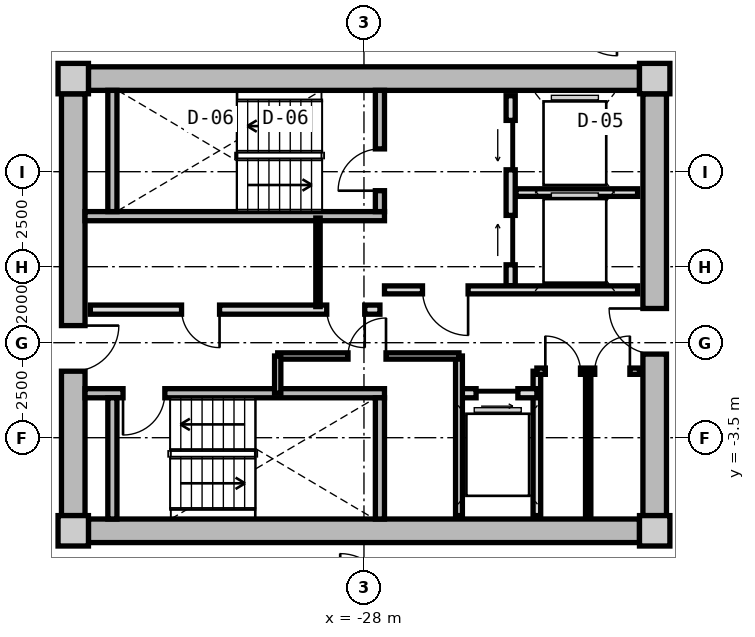
"""IFC4 building model, lengths in metres.
Left out: names, types, materials, properties, quantities, classifications, styles, units other than length and angle.
Written with IfcOpenShell. Run it as: python <this file> out.ifc"""

import sys

from ifc_helpers import new_model, si_unit, direction, frame, frame_2d, origin, origin_2d, place, context, subcontext, project, spatial, rectangle, extrude, source, transform, mapped, element, fill, save


model = new_model("IFC4")
c1 = context("Model", 3, precision=1e-05, world=origin(), true_north=direction((0.0, 1.0)))
c2 = subcontext(c1, "Body", "Model", "MODEL_VIEW")
j1 = project(units=[si_unit("LENGTHUNIT", "METRE"), si_unit("PLANEANGLEUNIT", "RADIAN")], contexts=[c1])
p1 = place(None, origin())
s1 = spatial("IfcSite", under=j1, at=p1, CompositionType="ELEMENT")
p2 = place(p1, origin())
s2 = spatial("IfcBuilding", under=s1, at=p2, CompositionType="ELEMENT")
p3 = place(p2, frame((0.0, 0.0, 164.8)))
s3 = spatial("IfcBuildingStorey", under=s2, at=p3, CompositionType="ELEMENT", Elevation=164.8)
m1 = source(origin(), c2, "Body", "SweptSolid", [
    extrude(rectangle(XDim=0.8, YDim=0.8, at=origin_2d()), origin(), (0.0, 0.0, 1.0), 3.05),
])
for number, where, z_axis, x_axis in (
    (1, (-35.65, -5.95, 0.0), (0.0, 0.0, 1.0), (1.0, 0.0, 0.0)),
    (2, (-20.35, -5.95, 0.0), (0.0, 0.0, 1.0), (1.0, 0.0, 0.0)),
    (3, (-20.35, 5.95, 0.0), (0.0, 0.0, 1.0), (1.0, 0.0, 0.0)),
    (4, (-35.65, 5.95, 0.0), (0.0, 0.0, 1.0), (1.0, 0.0, 0.0)),
):
    element("IfcColumn", number, at=place(p3, frame(where, z_axis=z_axis, x_axis=x_axis)), inside=s3, PredefinedType="COLUMN", context=c2, shape_type="MappedRepresentation", body=[
        mapped(m1, transform((0.0, 0.0, 0.0), x_axis=(1.0, 0.0, 0.0), y_axis=(0.0, 1.0, 0.0), z_axis=(0.0, 0.0, 1.0), scale=1.0)),
    ])
m2 = source(origin(), c2, "Body", "SweptSolid", [
    extrude(rectangle(XDim=14.5, YDim=0.62, at=frame_2d((7.25, 0.0))), origin(), (0.0, 0.0, 1.0), 2.81),
])
for number, where, z_axis, x_axis in (
    (5, (-35.25, 5.95, 0.0), (0.0, 0.0, 1.0), (1.0, 0.0, 0.0)),
    (6, (-20.75, -5.95, 0.0), (0.0, 0.0, 1.0), (-1.0, 0.0, 0.0)),
):
    element("IfcWall", number, at=place(p3, frame(where, z_axis=z_axis, x_axis=x_axis)), inside=s3, PredefinedType="SHEAR", context=c2, shape_type="MappedRepresentation", body=[
        mapped(m2, transform((0.0, 0.0, 0.0), x_axis=(1.0, 0.0, 0.0), y_axis=(0.0, 1.0, 0.0), z_axis=(0.0, 0.0, 1.0), scale=1.0)),
    ])
m3 = source(origin(), c2, "Body", "SweptSolid", [
    extrude(rectangle(XDim=11.1, YDim=0.62, at=frame_2d((5.55, 0.0))), origin(), (0.0, 0.0, 1.0), 2.81),
])
p4 = place(p3, frame((-35.65, -5.55, 0.0), z_axis=(0.0, 0.0, 1.0), x_axis=(0.0, 1.0, 0.0)))
e7 = element("IfcWall", 7, at=p4, inside=s3, PredefinedType="SHEAR", context=c2, shape_type="MappedRepresentation", body=[
    mapped(m3, transform((0.0, 0.0, 0.0), x_axis=(1.0, 0.0, 0.0), y_axis=(0.0, 1.0, 0.0), z_axis=(0.0, 0.0, 1.0), scale=1.0)),
])
p5 = place(p4, frame((3.8, 0.0, 0.0)))
e8 = element("IfcOpeningElement", 8, at=p5, cuts=e7, PredefinedType="OPENING", context=c2, shape_type="SweptSolid", body=[
    extrude(rectangle(XDim=1.2, YDim=2.15, at=frame_2d((0.6, 1.075))), frame((0.0, 0.32, 0.0), z_axis=(0.0, -1.0, 0.0), x_axis=(1.0, 0.0, 0.0)), (0.0, 0.0, 1.0), 0.64),
])
p6 = place(p3, frame((-20.35, 5.55, 0.0), z_axis=(0.0, 0.0, 1.0), x_axis=(0.0, -1.0, 0.0)))
e9 = element("IfcWall", 9, at=p6, inside=s3, PredefinedType="SHEAR", context=c2, shape_type="MappedRepresentation", body=[
    mapped(m3, transform((0.0, 0.0, 0.0), x_axis=(1.0, 0.0, 0.0), y_axis=(0.0, 1.0, 0.0), z_axis=(0.0, 0.0, 1.0), scale=1.0)),
])
p7 = place(p6, frame((5.65, 0.0, 0.0)))
e10 = element("IfcOpeningElement", 10, at=p7, cuts=e9, PredefinedType="OPENING", context=c2, shape_type="SweptSolid", body=[
    extrude(rectangle(XDim=1.2, YDim=2.15, at=frame_2d((0.6, 1.075))), frame((0.0, 0.32, 0.0), z_axis=(0.0, -1.0, 0.0), x_axis=(1.0, 0.0, 0.0)), (0.0, 0.0, 1.0), 0.64),
])
m4 = source(origin(), c2, "Body", "SweptSolid", [
    extrude(rectangle(XDim=7.88, YDim=0.24, at=frame_2d((3.94, 0.0))), origin(), (0.0, 0.0, 1.0), 2.81),
])
p8 = place(p3, frame((-35.34, 2.33, 0.0), z_axis=(0.0, 0.0, 1.0), x_axis=(1.0, 0.0, 0.0)))
e11 = element("IfcWall", 11, at=p8, inside=s3, PredefinedType="PARTITIONING", context=c2, shape_type="MappedRepresentation", body=[
    mapped(m4, transform((0.0, 0.0, 0.0), x_axis=(1.0, 0.0, 0.0), y_axis=(0.0, 1.0, 0.0), z_axis=(0.0, 0.0, 1.0), scale=1.0)),
])
m5 = source(origin(), c2, "Body", "SweptSolid", [
    extrude(rectangle(XDim=3.19, YDim=0.24, at=frame_2d((1.595, 0.0))), origin(), (0.0, 0.0, 1.0), 2.81),
])
p9 = place(p3, frame((-34.62, 2.45, 0.0), z_axis=(0.0, 0.0, 1.0), x_axis=(0.0, 1.0, 0.0)))
e12 = element("IfcWall", 12, at=p9, inside=s3, PredefinedType="PARTITIONING", context=c2, shape_type="MappedRepresentation", body=[
    mapped(m5, transform((0.0, 0.0, 0.0), x_axis=(1.0, 0.0, 0.0), y_axis=(0.0, 1.0, 0.0), z_axis=(0.0, 0.0, 1.0), scale=1.0)),
])
p10 = place(p3, frame((-27.58, 2.45, 0.0), z_axis=(0.0, 0.0, 1.0), x_axis=(0.0, 1.0, 0.0)))
e13 = element("IfcWall", 13, at=p10, inside=s3, PredefinedType="PARTITIONING", context=c2, shape_type="MappedRepresentation", body=[
    mapped(m5, transform((0.0, 0.0, 0.0), x_axis=(1.0, 0.0, 0.0), y_axis=(0.0, 1.0, 0.0), z_axis=(0.0, 0.0, 1.0), scale=1.0)),
])
p11 = place(p10, frame((0.55, 0.0, 0.0)))
e14 = element("IfcOpeningElement", 14, at=p11, cuts=e13, PredefinedType="OPENING", context=c2, shape_type="SweptSolid", body=[
    extrude(rectangle(XDim=1.1, YDim=2.15, at=frame_2d((0.55, 1.075))), frame((0.0, 0.13, 0.0), z_axis=(0.0, -1.0, 0.0), x_axis=(1.0, 0.0, 0.0)), (0.0, 0.0, 1.0), 0.26),
])
p12 = place(p3, frame((-35.34, -2.33, 0.0), z_axis=(0.0, 0.0, 1.0), x_axis=(1.0, 0.0, 0.0)))
e15 = element("IfcWall", 15, at=p12, inside=s3, PredefinedType="PARTITIONING", context=c2, shape_type="MappedRepresentation", body=[
    mapped(m4, transform((0.0, 0.0, 0.0), x_axis=(1.0, 0.0, 0.0), y_axis=(0.0, 1.0, 0.0), z_axis=(0.0, 0.0, 1.0), scale=1.0)),
])
p13 = place(p12, frame((1.0, 0.0, 0.0)))
e16 = element("IfcOpeningElement", 16, at=p13, cuts=e15, PredefinedType="OPENING", context=c2, shape_type="SweptSolid", body=[
    extrude(rectangle(XDim=1.1, YDim=2.15, at=frame_2d((0.55, 1.075))), frame((0.0, 0.13, 0.0), z_axis=(0.0, -1.0, 0.0), x_axis=(1.0, 0.0, 0.0)), (0.0, 0.0, 1.0), 0.26),
])
for number, where, z_axis, x_axis in (
    (17, (-34.62, -5.64, 0.0), (0.0, 0.0, 1.0), (0.0, 1.0, 0.0)),
    (18, (-27.58, -5.64, 0.0), (0.0, 0.0, 1.0), (0.0, 1.0, 0.0)),
):
    element("IfcWall", number, at=place(p3, frame(where, z_axis=z_axis, x_axis=x_axis)), inside=s3, PredefinedType="PARTITIONING", context=c2, shape_type="MappedRepresentation", body=[
        mapped(m5, transform((0.0, 0.0, 0.0), x_axis=(1.0, 0.0, 0.0), y_axis=(0.0, 1.0, 0.0), z_axis=(0.0, 0.0, 1.0), scale=1.0)),
    ])
m6 = source(origin(), c2, "Body", "SweptSolid", [
    extrude(rectangle(XDim=5.0, YDim=0.24, at=frame_2d((2.5, 0.0))), origin(), (0.0, 0.0, 1.0), 2.795),
])
p14 = place(p3, frame((-24.14, 0.5, 0.0), z_axis=(0.0, 0.0, 1.0), x_axis=(0.0, 1.0, 0.0)))
e19 = element("IfcWall", 19, at=p14, inside=s3, PredefinedType="PARTITIONING", context=c2, shape_type="MappedRepresentation", body=[
    mapped(m6, transform((0.0, 0.0, 0.0), x_axis=(1.0, 0.0, 0.0), y_axis=(0.0, 1.0, 0.0), z_axis=(0.0, 0.0, 1.0), scale=1.0)),
])
p15 = place(p14, frame((3.05, 0.0, 0.0)))
e20 = element("IfcOpeningElement", 20, at=p15, cuts=e19, PredefinedType="OPENING", context=c2, shape_type="SweptSolid", body=[
    extrude(rectangle(XDim=1.3, YDim=2.2, at=frame_2d((0.65, 1.1))), frame((0.0, 0.13, 0.0), z_axis=(0.0, -1.0, 0.0), x_axis=(1.0, 0.0, 0.0)), (0.0, 0.0, 1.0), 0.26),
])
p16 = place(p14, frame((0.55, 0.0, 0.0)))
e21 = element("IfcOpeningElement", 21, at=p16, cuts=e19, PredefinedType="OPENING", context=c2, shape_type="SweptSolid", body=[
    extrude(rectangle(XDim=1.3, YDim=2.2, at=frame_2d((0.65, 1.1))), frame((0.0, 0.13, 0.0), z_axis=(0.0, -1.0, 0.0), x_axis=(1.0, 0.0, 0.0)), (0.0, 0.0, 1.0), 0.26),
])
m7 = source(origin(), c2, "Body", "SweptSolid", [
    extrude(rectangle(XDim=3.2, YDim=0.2, at=frame_2d((1.6, 0.0))), origin(), (0.0, 0.0, 1.0), 2.795),
])
p17 = place(p3, frame((-24.0, 2.95, 0.0), z_axis=(0.0, 0.0, 1.0), x_axis=(1.0, 0.0, 0.0)))
e22 = element("IfcWall", 22, at=p17, inside=s3, PredefinedType="PARTITIONING", context=c2, shape_type="MappedRepresentation", body=[
    mapped(m7, transform((0.0, 0.0, 0.0), x_axis=(1.0, 0.0, 0.0), y_axis=(0.0, 1.0, 0.0), z_axis=(0.0, 0.0, 1.0), scale=1.0)),
])
m8 = source(origin(), c2, "Body", "SweptSolid", [
    extrude(rectangle(XDim=6.66, YDim=0.21, at=frame_2d((3.33, 0.0))), origin(), (0.0, 0.0, 1.0), 2.795),
])
p18 = place(p3, frame((-27.46, 0.39, 0.0), z_axis=(0.0, 0.0, 1.0), x_axis=(1.0, 0.0, 0.0)))
e23 = element("IfcWall", 23, at=p18, inside=s3, PredefinedType="PARTITIONING", context=c2, shape_type="MappedRepresentation", body=[
    mapped(m8, transform((0.0, 0.0, 0.0), x_axis=(1.0, 0.0, 0.0), y_axis=(0.0, 1.0, 0.0), z_axis=(0.0, 0.0, 1.0), scale=1.0)),
])
p19 = place(p18, frame((1.0, 0.0, 0.0)))
e24 = element("IfcOpeningElement", 24, at=p19, cuts=e23, PredefinedType="OPENING", context=c2, shape_type="SweptSolid", body=[
    extrude(rectangle(XDim=1.2, YDim=2.15, at=frame_2d((0.6, 1.075))), frame((0.0, 0.115, 0.0), z_axis=(0.0, -1.0, 0.0), x_axis=(1.0, 0.0, 0.0)), (0.0, 0.0, 1.0), 0.23),
])
m9 = source(origin(), c2, "Body", "SweptSolid", [
    extrude(rectangle(XDim=7.62, YDim=0.24, at=frame_2d((3.81, 0.0))), origin(), (0.0, 0.0, 1.0), 2.795),
])
p20 = place(p3, frame((-35.2, -0.13, 0.0), z_axis=(0.0, 0.0, 1.0), x_axis=(1.0, 0.0, 0.0)))
e25 = element("IfcWall", 25, at=p20, inside=s3, PredefinedType="PARTITIONING", context=c2, shape_type="MappedRepresentation", body=[
    mapped(m9, transform((0.0, 0.0, 0.0), x_axis=(1.0, 0.0, 0.0), y_axis=(0.0, 1.0, 0.0), z_axis=(0.0, 0.0, 1.0), scale=1.0)),
])
p21 = place(p20, frame((6.22, 0.0, 0.0)))
e26 = element("IfcOpeningElement", 26, at=p21, cuts=e25, PredefinedType="OPENING", context=c2, shape_type="SweptSolid", body=[
    extrude(rectangle(XDim=1.0, YDim=2.1, at=frame_2d((0.5, 1.05))), frame((0.0, 0.13, 0.0), z_axis=(0.0, -1.0, 0.0), x_axis=(1.0, 0.0, 0.0)), (0.0, 0.0, 1.0), 0.26),
])
p22 = place(p20, frame((2.4, 0.0, 0.0)))
e27 = element("IfcOpeningElement", 27, at=p22, cuts=e25, PredefinedType="OPENING", context=c2, shape_type="SweptSolid", body=[
    extrude(rectangle(XDim=1.0, YDim=2.1, at=frame_2d((0.5, 1.05))), frame((0.0, 0.13, 0.0), z_axis=(0.0, -1.0, 0.0), x_axis=(1.0, 0.0, 0.0)), (0.0, 0.0, 1.0), 0.26),
])
m10 = source(origin(), c2, "Body", "SweptSolid", [
    extrude(rectangle(XDim=2.33, YDim=0.115, at=frame_2d((1.165, 0.0))), origin(), (0.0, 0.0, 1.0), 2.795),
])
p23 = place(p3, frame((-29.21, -0.05, 0.0), z_axis=(0.0, 0.0, 1.0), x_axis=(0.0, 1.0, 0.0)))
e28 = element("IfcWall", 28, at=p23, inside=s3, PredefinedType="PARTITIONING", context=c2, shape_type="MappedRepresentation", body=[
    mapped(m10, transform((0.0, 0.0, 0.0), x_axis=(1.0, 0.0, 0.0), y_axis=(0.0, 1.0, 0.0), z_axis=(0.0, 0.0, 1.0), scale=1.0)),
])
m11 = source(origin(), c2, "Body", "SweptSolid", [
    extrude(rectangle(XDim=3.8, YDim=0.2, at=frame_2d((1.9, 0.0))), origin(), (0.0, 0.0, 1.0), 2.795),
])
p24 = place(p3, frame((-23.45, -5.55, 0.0), z_axis=(0.0, 0.0, 1.0), x_axis=(0.0, 1.0, 0.0)))
e29 = element("IfcWall", 29, at=p24, inside=s3, PredefinedType="PARTITIONING", context=c2, shape_type="MappedRepresentation", body=[
    mapped(m11, transform((0.0, 0.0, 0.0), x_axis=(1.0, 0.0, 0.0), y_axis=(0.0, 1.0, 0.0), z_axis=(0.0, 0.0, 1.0), scale=1.0)),
])
m12 = source(origin(), c2, "Body", "SweptSolid", [
    extrude(rectangle(XDim=2.05, YDim=0.24, at=frame_2d((1.025, 0.0))), origin(), (0.0, 0.0, 1.0), 2.795),
])
p25 = place(p3, frame((-25.5, -2.33, 0.0), z_axis=(0.0, 0.0, 1.0), x_axis=(1.0, 0.0, 0.0)))
e30 = element("IfcWall", 30, at=p25, inside=s3, PredefinedType="PARTITIONING", context=c2, shape_type="MappedRepresentation", body=[
    mapped(m12, transform((0.0, 0.0, 0.0), x_axis=(1.0, 0.0, 0.0), y_axis=(0.0, 1.0, 0.0), z_axis=(0.0, 0.0, 1.0), scale=1.0)),
])
p26 = place(p25, frame((0.45, 0.0, 0.0)))
e31 = element("IfcOpeningElement", 31, at=p26, cuts=e30, PredefinedType="OPENING", context=c2, shape_type="SweptSolid", body=[
    extrude(rectangle(XDim=1.1, YDim=2.2, at=frame_2d((0.55, 1.1))), frame((0.0, 0.13, 0.0), z_axis=(0.0, -1.0, 0.0), x_axis=(1.0, 0.0, 0.0)), (0.0, 0.0, 1.0), 0.26),
])
m13 = source(origin(), c2, "Body", "SweptSolid", [
    extrude(rectangle(XDim=4.2, YDim=0.18, at=frame_2d((2.1, 0.0))), origin(), (0.0, 0.0, 1.0), 2.795),
])
p27 = place(p3, frame((-25.5, -5.55, 0.0), z_axis=(0.0, 0.0, 1.0), x_axis=(0.0, 1.0, 0.0)))
e32 = element("IfcWall", 32, at=p27, inside=s3, PredefinedType="PARTITIONING", context=c2, shape_type="MappedRepresentation", body=[
    mapped(m13, transform((0.0, 0.0, 0.0), x_axis=(1.0, 0.0, 0.0), y_axis=(0.0, 1.0, 0.0), z_axis=(0.0, 0.0, 1.0), scale=1.0)),
])
m14 = source(origin(), c2, "Body", "SweptSolid", [
    extrude(rectangle(XDim=4.77, YDim=0.165, at=frame_2d((2.385, 0.0))), origin(), (0.0, 0.0, 1.0), 2.795),
])
p28 = place(p3, frame((-30.27, -1.35, 0.0), z_axis=(0.0, 0.0, 1.0), x_axis=(1.0, 0.0, 0.0)))
e33 = element("IfcWall", 33, at=p28, inside=s3, PredefinedType="PARTITIONING", context=c2, shape_type="MappedRepresentation", body=[
    mapped(m14, transform((0.0, 0.0, 0.0), x_axis=(1.0, 0.0, 0.0), y_axis=(0.0, 1.0, 0.0), z_axis=(0.0, 0.0, 1.0), scale=1.0)),
])
p29 = place(p28, frame((1.85, 0.0, 0.0)))
e34 = element("IfcOpeningElement", 34, at=p29, cuts=e33, PredefinedType="OPENING", context=c2, shape_type="SweptSolid", body=[
    extrude(rectangle(XDim=1.0, YDim=2.1, at=frame_2d((0.5, 1.05))), frame((0.0, 0.093, 0.0), z_axis=(0.0, -1.0, 0.0), x_axis=(1.0, 0.0, 0.0)), (0.0, 0.0, 1.0), 0.185),
])
m15 = source(origin(), c2, "Body", "SweptSolid", [
    extrude(rectangle(XDim=0.98, YDim=0.165, at=frame_2d((0.49, 0.0))), origin(), (0.0, 0.0, 1.0), 2.795),
])
p30 = place(p3, frame((-30.27, -2.33, 0.0), z_axis=(0.0, 0.0, 1.0), x_axis=(0.0, 1.0, 0.0)))
e35 = element("IfcWall", 35, at=p30, inside=s3, PredefinedType="PARTITIONING", context=c2, shape_type="MappedRepresentation", body=[
    mapped(m15, transform((0.0, 0.0, 0.0), x_axis=(1.0, 0.0, 0.0), y_axis=(0.0, 1.0, 0.0), z_axis=(0.0, 0.0, 1.0), scale=1.0)),
])
m16 = source(origin(), c2, "Body", "SweptSolid", [
    extrude(rectangle(XDim=2.7, YDim=0.165, at=frame_2d((1.35, 0.0))), origin(), (0.0, 0.0, 1.0), 2.795),
])
p31 = place(p3, frame((-23.45, -1.75, 0.0), z_axis=(0.0, 0.0, 1.0), x_axis=(1.0, 0.0, 0.0)))
e36 = element("IfcWall", 36, at=p31, inside=s3, PredefinedType="PARTITIONING", context=c2, shape_type="MappedRepresentation", body=[
    mapped(m16, transform((0.0, 0.0, 0.0), x_axis=(1.0, 0.0, 0.0), y_axis=(0.0, 1.0, 0.0), z_axis=(0.0, 0.0, 1.0), scale=1.0)),
])
p32 = place(p31, frame((0.222, 0.0, 0.0)))
e37 = element("IfcOpeningElement", 37, at=p32, cuts=e36, PredefinedType="OPENING", context=c2, shape_type="SweptSolid", body=[
    extrude(rectangle(XDim=0.925, YDim=2.1, at=frame_2d((0.462, 1.05))), frame((0.0, 0.093, 0.0), z_axis=(0.0, -1.0, 0.0), x_axis=(1.0, 0.0, 0.0)), (0.0, 0.0, 1.0), 0.185),
])
p33 = place(p31, frame((1.522, 0.0, 0.0)))
e38 = element("IfcOpeningElement", 38, at=p33, cuts=e36, PredefinedType="OPENING", context=c2, shape_type="SweptSolid", body=[
    extrude(rectangle(XDim=0.925, YDim=2.1, at=frame_2d((0.462, 1.05))), frame((0.0, 0.093, 0.0), z_axis=(0.0, -1.0, 0.0), x_axis=(1.0, 0.0, 0.0)), (0.0, 0.0, 1.0), 0.185),
])
m17 = source(origin(), c2, "Body", "SweptSolid", [
    extrude(rectangle(XDim=3.8, YDim=0.14, at=frame_2d((1.9, 0.0))), origin(), (0.0, 0.0, 1.0), 2.795),
])
p34 = place(p3, frame((-22.1, -5.55, 0.0), z_axis=(0.0, 0.0, 1.0), x_axis=(0.0, 1.0, 0.0)))
e39 = element("IfcWall", 39, at=p34, inside=s3, PredefinedType="PARTITIONING", context=c2, shape_type="MappedRepresentation", body=[
    mapped(m17, transform((0.0, 0.0, 0.0), x_axis=(1.0, 0.0, 0.0), y_axis=(0.0, 1.0, 0.0), z_axis=(0.0, 0.0, 1.0), scale=1.0)),
])
m18 = source(origin(), c2, "Body", "SweptSolid", [
    extrude(rectangle(XDim=1.1, YDim=2.15, at=frame_2d((0.55, 1.075))), frame((0.0, 0.025, 0.0), z_axis=(0.0, -1.0, 0.0), x_axis=(1.0, 0.0, 0.0)), (0.0, 0.0, 1.0), 0.05),
])
p35 = place(p11, origin())
e40 = element("IfcDoor", 40, at=p35, inside=s3, OperationType="SINGLE_SWING_LEFT", PredefinedType="DOOR", context=c2, shape_type="MappedRepresentation", body=[
    mapped(m18, transform((0.0, 0.0, 0.0), x_axis=(1.0, 0.0, 0.0), y_axis=(0.0, 1.0, 0.0), z_axis=(0.0, 0.0, 1.0), scale=1.0)),
])
fill(e14, e40)
p36 = place(p13, frame((1.1, 0.0, 0.0), z_axis=(0.0, 0.0, 1.0), x_axis=(-1.0, 0.0, 0.0)))
e41 = element("IfcDoor", 41, at=p36, inside=s3, OperationType="SINGLE_SWING_RIGHT", PredefinedType="DOOR", context=c2, shape_type="MappedRepresentation", body=[
    mapped(m18, transform((0.0, 0.0, 0.0), x_axis=(1.0, 0.0, 0.0), y_axis=(0.0, 1.0, 0.0), z_axis=(0.0, 0.0, 1.0), scale=1.0)),
])
fill(e16, e41)
m19 = source(origin(), c2, "Body", "SweptSolid", [
    extrude(rectangle(XDim=1.3, YDim=2.2, at=frame_2d((0.65, 1.1))), frame((0.0, 0.025, 0.0), z_axis=(0.0, -1.0, 0.0), x_axis=(1.0, 0.0, 0.0)), (0.0, 0.0, 1.0), 0.05),
])
p37 = place(p15, origin())
e42 = element("IfcDoor", 42, at=p37, inside=s3, OperationType="SLIDING_TO_LEFT", PredefinedType="DOOR", context=c2, shape_type="MappedRepresentation", body=[
    mapped(m19, transform((0.0, 0.0, 0.0), x_axis=(1.0, 0.0, 0.0), y_axis=(0.0, 1.0, 0.0), z_axis=(0.0, 0.0, 1.0), scale=1.0)),
])
fill(e20, e42)
p38 = place(p16, origin())
e43 = element("IfcDoor", 43, at=p38, inside=s3, OperationType="SLIDING_TO_RIGHT", PredefinedType="DOOR", context=c2, shape_type="MappedRepresentation", body=[
    mapped(m19, transform((0.0, 0.0, 0.0), x_axis=(1.0, 0.0, 0.0), y_axis=(0.0, 1.0, 0.0), z_axis=(0.0, 0.0, 1.0), scale=1.0)),
])
fill(e21, e43)
m20 = source(origin(), c2, "Body", "SweptSolid", [
    extrude(rectangle(XDim=1.2, YDim=2.15, at=frame_2d((0.6, 1.075))), frame((0.0, 0.025, 0.0), z_axis=(0.0, -1.0, 0.0), x_axis=(1.0, 0.0, 0.0)), (0.0, 0.0, 1.0), 0.05),
])
p39 = place(p19, frame((1.2, 0.0, 0.0), z_axis=(0.0, 0.0, 1.0), x_axis=(-1.0, 0.0, 0.0)))
e44 = element("IfcDoor", 44, at=p39, inside=s3, OperationType="SINGLE_SWING_LEFT", PredefinedType="DOOR", context=c2, shape_type="MappedRepresentation", body=[
    mapped(m20, transform((0.0, 0.0, 0.0), x_axis=(1.0, 0.0, 0.0), y_axis=(0.0, 1.0, 0.0), z_axis=(0.0, 0.0, 1.0), scale=1.0)),
])
fill(e24, e44)
p40 = place(p5, frame((1.2, 0.0, 0.0), z_axis=(0.0, 0.0, 1.0), x_axis=(-1.0, 0.0, 0.0)))
e45 = element("IfcDoor", 45, at=p40, inside=s3, OperationType="SINGLE_SWING_LEFT", PredefinedType="DOOR", context=c2, shape_type="MappedRepresentation", body=[
    mapped(m20, transform((0.0, 0.0, 0.0), x_axis=(1.0, 0.0, 0.0), y_axis=(0.0, 1.0, 0.0), z_axis=(0.0, 0.0, 1.0), scale=1.0)),
])
fill(e8, e45)
p41 = place(p7, frame((1.2, 0.0, 0.0), z_axis=(0.0, 0.0, 1.0), x_axis=(-1.0, 0.0, 0.0)))
e46 = element("IfcDoor", 46, at=p41, inside=s3, OperationType="SINGLE_SWING_RIGHT", PredefinedType="DOOR", context=c2, shape_type="MappedRepresentation", body=[
    mapped(m20, transform((0.0, 0.0, 0.0), x_axis=(1.0, 0.0, 0.0), y_axis=(0.0, 1.0, 0.0), z_axis=(0.0, 0.0, 1.0), scale=1.0)),
])
fill(e10, e46)
m21 = source(origin(), c2, "Body", "SweptSolid", [
    extrude(rectangle(XDim=1.0, YDim=2.1, at=frame_2d((0.5, 1.05))), frame((0.0, 0.025, 0.0), z_axis=(0.0, -1.0, 0.0), x_axis=(1.0, 0.0, 0.0)), (0.0, 0.0, 1.0), 0.05),
])
p42 = place(p21, frame((1.0, 0.0, 0.0), z_axis=(0.0, 0.0, 1.0), x_axis=(-1.0, 0.0, 0.0)))
e47 = element("IfcDoor", 47, at=p42, inside=s3, OperationType="SINGLE_SWING_LEFT", PredefinedType="DOOR", context=c2, shape_type="MappedRepresentation", body=[
    mapped(m21, transform((0.0, 0.0, 0.0), x_axis=(1.0, 0.0, 0.0), y_axis=(0.0, 1.0, 0.0), z_axis=(0.0, 0.0, 1.0), scale=1.0)),
])
fill(e26, e47)
p43 = place(p22, frame((1.0, 0.0, 0.0), z_axis=(0.0, 0.0, 1.0), x_axis=(-1.0, 0.0, 0.0)))
e48 = element("IfcDoor", 48, at=p43, inside=s3, OperationType="SINGLE_SWING_LEFT", PredefinedType="DOOR", context=c2, shape_type="MappedRepresentation", body=[
    mapped(m21, transform((0.0, 0.0, 0.0), x_axis=(1.0, 0.0, 0.0), y_axis=(0.0, 1.0, 0.0), z_axis=(0.0, 0.0, 1.0), scale=1.0)),
])
fill(e27, e48)
m22 = source(origin(), c2, "Body", "SweptSolid", [
    extrude(rectangle(XDim=1.1, YDim=2.2, at=frame_2d((0.55, 1.1))), frame((0.0, 0.025, 0.0), z_axis=(0.0, -1.0, 0.0), x_axis=(1.0, 0.0, 0.0)), (0.0, 0.0, 1.0), 0.05),
])
p44 = place(p26, frame((1.1, 0.0, 0.0), z_axis=(0.0, 0.0, 1.0), x_axis=(-1.0, 0.0, 0.0)))
e49 = element("IfcDoor", 49, at=p44, inside=s3, OperationType="SLIDING_TO_RIGHT", PredefinedType="DOOR", context=c2, shape_type="MappedRepresentation", body=[
    mapped(m22, transform((0.0, 0.0, 0.0), x_axis=(1.0, 0.0, 0.0), y_axis=(0.0, 1.0, 0.0), z_axis=(0.0, 0.0, 1.0), scale=1.0)),
])
fill(e31, e49)
p45 = place(p29, origin())
e50 = element("IfcDoor", 50, at=p45, inside=s3, OperationType="SINGLE_SWING_RIGHT", PredefinedType="DOOR", context=c2, shape_type="MappedRepresentation", body=[
    mapped(m21, transform((0.0, 0.0, 0.0), x_axis=(1.0, 0.0, 0.0), y_axis=(0.0, 1.0, 0.0), z_axis=(0.0, 0.0, 1.0), scale=1.0)),
])
fill(e34, e50)
m23 = source(origin(), c2, "Body", "SweptSolid", [
    extrude(rectangle(XDim=0.925, YDim=2.1, at=frame_2d((0.462, 1.05))), frame((0.0, 0.025, 0.0), z_axis=(0.0, -1.0, 0.0), x_axis=(1.0, 0.0, 0.0)), (0.0, 0.0, 1.0), 0.05),
])
p46 = place(p32, origin())
e51 = element("IfcDoor", 51, at=p46, inside=s3, OperationType="SINGLE_SWING_LEFT", PredefinedType="DOOR", context=c2, shape_type="MappedRepresentation", body=[
    mapped(m23, transform((0.0, 0.0, 0.0), x_axis=(1.0, 0.0, 0.0), y_axis=(0.0, 1.0, 0.0), z_axis=(0.0, 0.0, 1.0), scale=1.0)),
])
fill(e37, e51)
p47 = place(p33, origin())
e52 = element("IfcDoor", 52, at=p47, inside=s3, OperationType="SINGLE_SWING_RIGHT", PredefinedType="DOOR", context=c2, shape_type="MappedRepresentation", body=[
    mapped(m23, transform((0.0, 0.0, 0.0), x_axis=(1.0, 0.0, 0.0), y_axis=(0.0, 1.0, 0.0), z_axis=(0.0, 0.0, 1.0), scale=1.0)),
])
fill(e38, e52)
save(model, sys.argv[1])
